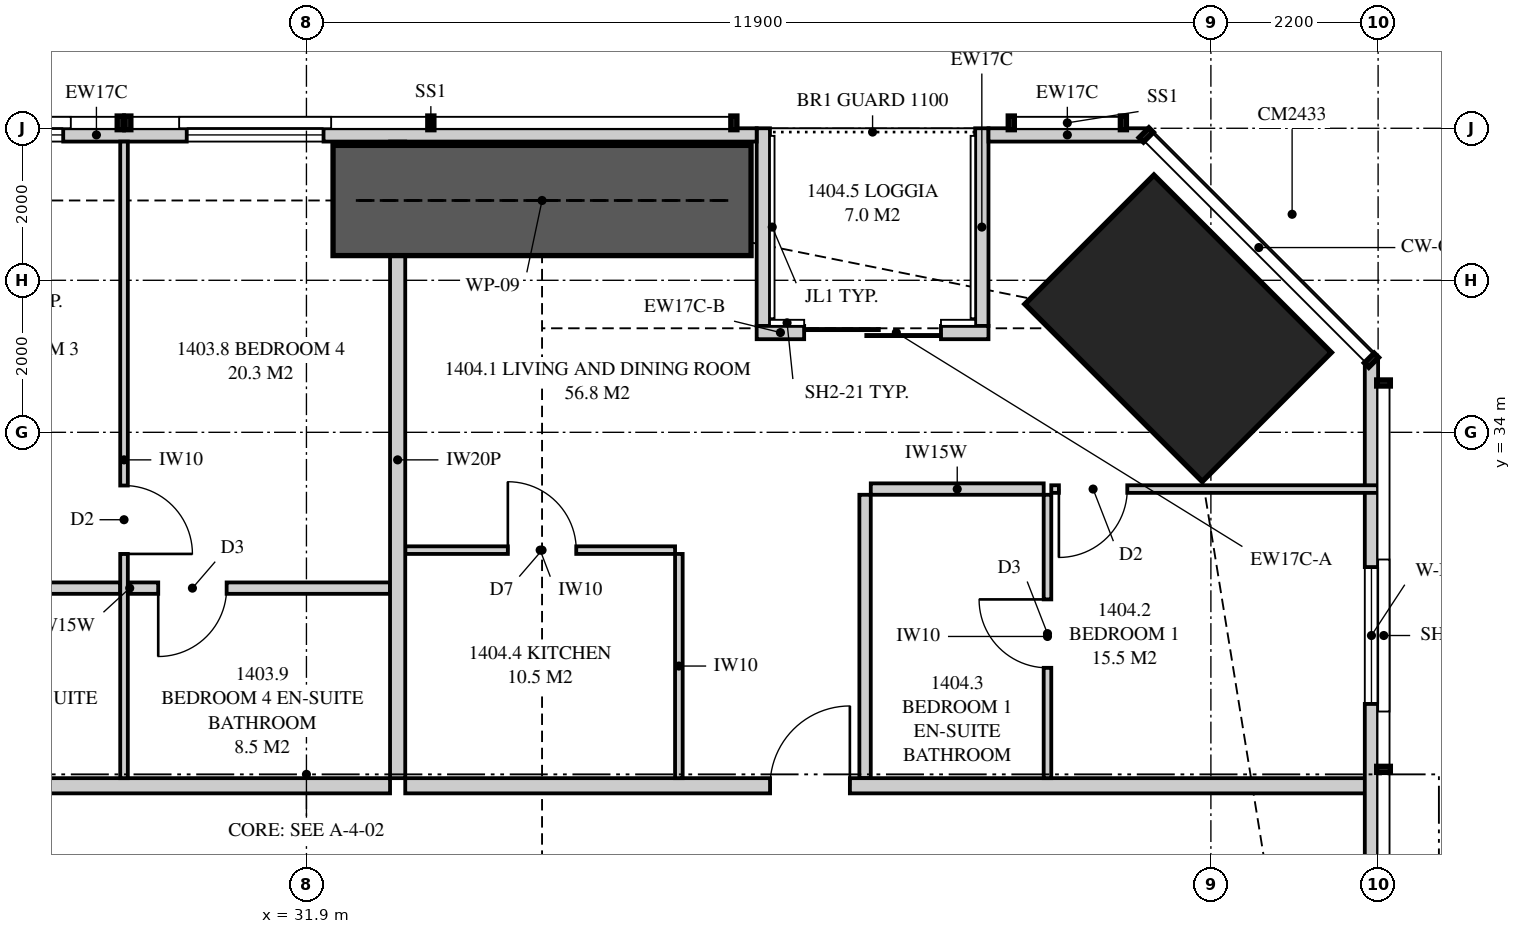
"""IFC4 building model, lengths in metres.
Left out: names, types, materials, properties, quantities, classifications, styles, units other than length and angle.
Written with IfcOpenShell. Run it as: python <this file> out.ifc"""

import sys

from ifc_helpers import new_model, si_unit, direction, frame, frame_2d, origin, origin_2d, place, context, subcontext, project, spatial, polyline, rectangle, outline, extrude, element, fill, save


model = new_model("IFC4")
c1 = context("Model", 3, precision=1e-05, world=origin(), true_north=direction((0.0, 1.0)))
c2 = subcontext(c1, "Body", "Model", "MODEL_VIEW")
j1 = project(units=[si_unit("LENGTHUNIT", "METRE"), si_unit("PLANEANGLEUNIT", "RADIAN")], contexts=[c1])
p1 = place(None, origin())
s1 = spatial("IfcSite", under=j1, at=p1, CompositionType="ELEMENT")
p2 = place(p1, origin())
s2 = spatial("IfcBuilding", under=s1, at=p2, CompositionType="ELEMENT")
p3 = place(p2, frame((0.0, 0.0, 54.5)))
s3 = spatial("IfcBuildingStorey", under=s2, at=p3, CompositionType="ELEMENT", Elevation=54.5)
p4 = place(p3, frame((43.369, 35.369, 0.0), z_axis=(0.0, 0.0, 1.0), x_axis=(-0.707106781187, -0.707106781187, 0.0)))
e1 = element("IfcColumn", 1, at=p4, inside=s3, PredefinedType="COLUMN", context=c2, shape_type="SweptSolid", body=[
    extrude(rectangle(XDim=2.4, YDim=3.3, at=origin_2d()), origin(), (0.0, 0.0, 1.0), 3.35),
])
p5 = place(p3, frame((45.913, 3.051, 0.0), z_axis=(0.0, 0.0, 1.0), x_axis=(0.0, 1.0, 0.0)))
e2 = element("IfcWall", 2, at=p5, inside=s3, PredefinedType="SOLIDWALL", context=c2, shape_type="SweptSolid", body=[
    extrude(outline(polyline([(0.0, 0.0), (31.897, 0.0), (31.897, 3.11), (22.167, 3.11), (22.167, 2.15), (22.074, 2.15), (22.074, 3.11), (21.949, 3.11), (21.949, 2.15), (9.949, 2.15), (9.949, 3.11), (9.823, 3.11), (9.823, 2.15), (9.73, 2.15), (9.73, 3.11), (0.0, 3.11), (0.0, 0.0)])), frame((0.0, 0.087, 0.0), z_axis=(0.0, -1.0, 0.0), x_axis=(1.0, 0.0, 0.0)), (0.0, 0.0, 1.0), 0.175),
])
p6 = place(p5, frame((2.222, 0.0, 0.4)))
e3 = element("IfcOpeningElement", 3, at=p6, cuts=e2, PredefinedType="OPENING", context=c2, shape_type="SweptSolid", body=[
    extrude(rectangle(XDim=1.8, YDim=1.7, at=frame_2d((0.9, 0.85))), frame((0.0, 0.097, 0.0), z_axis=(0.0, -1.0, 0.0), x_axis=(1.0, 0.0, 0.0)), (0.0, 0.0, 1.0), 0.195),
])
p7 = place(p5, frame((14.849, 0.0, 0.4)))
e4 = element("IfcOpeningElement", 4, at=p7, cuts=e2, PredefinedType="OPENING", context=c2, shape_type="SweptSolid", body=[
    extrude(rectangle(XDim=1.2, YDim=1.7, at=frame_2d((0.6, 0.85))), frame((0.0, 0.097, 0.0), z_axis=(0.0, -1.0, 0.0), x_axis=(1.0, 0.0, 0.0)), (0.0, 0.0, 1.0), 0.195),
])
p8 = place(p5, frame((27.375, 0.0, 0.4)))
e5 = element("IfcOpeningElement", 5, at=p8, cuts=e2, PredefinedType="OPENING", context=c2, shape_type="SweptSolid", body=[
    extrude(rectangle(XDim=1.8, YDim=1.7, at=frame_2d((0.9, 0.85))), frame((0.0, 0.097, 0.0), z_axis=(0.0, -1.0, 0.0), x_axis=(1.0, 0.0, 0.0)), (0.0, 0.0, 1.0), 0.195),
])
p9 = place(p3, frame((42.949, 37.913, 0.0), z_axis=(0.0, 0.0, 1.0), x_axis=(-1.0, 0.0, 0.0)))
e6 = element("IfcWall", 6, at=p9, inside=s3, PredefinedType="SOLIDWALL", context=c2, shape_type="SweptSolid", body=[
    extrude(rectangle(XDim=2.075, YDim=0.175, at=frame_2d((1.038, 0.0))), origin(), (0.0, 0.0, 1.0), 3.11),
])
p10 = place(p3, frame((37.824, 37.913, 0.0), z_axis=(0.0, 0.0, 1.0), x_axis=(-1.0, 0.0, 0.0)))
e7 = element("IfcWall", 7, at=p10, inside=s3, PredefinedType="SOLIDWALL", context=c2, shape_type="SweptSolid", body=[
    extrude(outline(polyline([(0.0, 0.0), (17.374, 0.0), (17.374, 2.15), (2.824, 2.15), (2.824, 3.11), (2.668, 3.11), (2.668, 2.15), (2.62, 2.15), (2.62, 3.11), (0.0, 3.11), (0.0, 0.0)])), frame((0.0, 0.087, 0.0), z_axis=(0.0, -1.0, 0.0), x_axis=(1.0, 0.0, 0.0)), (0.0, 0.0, 1.0), 0.175),
])
p11 = place(p10, frame((5.699, 0.0, 0.4)))
e8 = element("IfcOpeningElement", 8, at=p11, cuts=e7, PredefinedType="OPENING", context=c2, shape_type="SweptSolid", body=[
    extrude(rectangle(XDim=1.8, YDim=1.7, at=frame_2d((0.9, 0.85))), frame((0.0, 0.097, 0.0), z_axis=(0.0, -1.0, 0.0), x_axis=(1.0, 0.0, 0.0)), (0.0, 0.0, 1.0), 0.195),
])
p12 = place(p10, frame((9.124, 0.0, 0.4)))
e9 = element("IfcOpeningElement", 9, at=p12, cuts=e7, PredefinedType="OPENING", context=c2, shape_type="SweptSolid", body=[
    extrude(rectangle(XDim=1.8, YDim=1.7, at=frame_2d((0.9, 0.85))), frame((0.0, 0.097, 0.0), z_axis=(0.0, -1.0, 0.0), x_axis=(1.0, 0.0, 0.0)), (0.0, 0.0, 1.0), 0.195),
])
p13 = place(p3, frame((40.874, 35.312, 0.0), z_axis=(0.0, 0.0, 1.0), x_axis=(-1.0, 0.0, 0.0)))
e10 = element("IfcWall", 10, at=p13, inside=s3, PredefinedType="SOLIDWALL", context=c2, shape_type="SweptSolid", body=[
    extrude(rectangle(XDim=2.425, YDim=0.175, at=frame_2d((1.212, 0.0))), origin(), (0.0, 0.0, 1.0), 2.15),
])
p14 = place(p13, frame((0.625, 0.0, 0.0)))
e11 = element("IfcOpeningElement", 11, at=p14, cuts=e10, PredefinedType="OPENING", context=c2, shape_type="SweptSolid", body=[
    extrude(rectangle(XDim=1.8, YDim=2.1, at=frame_2d((0.9, 1.05))), frame((0.0, 0.097, 0.0), z_axis=(0.0, -1.0, 0.0), x_axis=(1.0, 0.0, 0.0)), (0.0, 0.0, 1.0), 0.195),
])
p15 = place(p3, frame((38.449, 35.312, 0.0), z_axis=(0.0, 0.0, 1.0), x_axis=(-1.0, 0.0, 0.0)))
e12 = element("IfcWall", 12, at=p15, inside=s3, PredefinedType="SOLIDWALL", context=c2, shape_type="SweptSolid", body=[
    extrude(rectangle(XDim=0.625, YDim=0.175, at=frame_2d((0.312, 0.0))), origin(), (0.0, 0.0, 1.0), 2.51),
])
p16 = place(p3, frame((40.786, 38.0, 0.0), z_axis=(0.0, 0.0, 1.0), x_axis=(0.0, -1.0, 0.0)))
e13 = element("IfcWall", 13, at=p16, inside=s3, PredefinedType="SOLIDWALL", context=c2, shape_type="SweptSolid", body=[
    extrude(outline(polyline([(0.0, 0.0), (2.6, 0.0), (2.6, 2.15), (1.279, 2.15), (1.279, 3.11), (0.0, 3.11), (0.0, 0.0)])), frame((0.0, 0.087, 0.0), z_axis=(0.0, -1.0, 0.0), x_axis=(1.0, 0.0, 0.0)), (0.0, 0.0, 1.0), 0.175),
])
p17 = place(p3, frame((37.911, 38.0, 0.0), z_axis=(0.0, 0.0, 1.0), x_axis=(0.0, -1.0, 0.0)))
e14 = element("IfcWall", 14, at=p17, inside=s3, PredefinedType="SOLIDWALL", context=c2, shape_type="SweptSolid", body=[
    extrude(outline(polyline([(0.0, 0.0), (2.6, 0.0), (2.6, 2.51), (2.368, 2.51), (2.368, 2.15), (0.701, 2.15), (0.701, 3.11), (0.0, 3.11), (0.0, 0.0)])), frame((0.0, 0.087, 0.0), z_axis=(0.0, -1.0, 0.0), x_axis=(1.0, 0.0, 0.0)), (0.0, 0.0, 1.0), 0.175),
])
p18 = place(p3, frame((33.1, 37.825, 0.0), z_axis=(0.0, 0.0, 1.0), x_axis=(0.0, -1.0, 0.0)))
e15 = element("IfcWall", 15, at=p18, inside=s3, PredefinedType="PARTITIONING", context=c2, shape_type="SweptSolid", body=[
    extrude(outline(polyline([(0.529, 2.15), (0.0, 2.15), (0.0, 0.0), (0.529, 0.0), (0.529, 0.205), (1.021, 0.205), (1.021, 0.0), (8.375, 0.0), (8.375, 3.11), (1.685, 3.11), (1.685, 2.15), (1.021, 2.15), (1.021, 1.945), (0.529, 1.945), (0.529, 2.15)])), frame((0.0, 0.1, 0.0), z_axis=(0.0, -1.0, 0.0), x_axis=(1.0, 0.0, 0.0)), (0.0, 0.0, 1.0), 0.2),
])
p19 = place(p3, frame((17.725, 29.35, 0.0), z_axis=(0.0, 0.0, 1.0), x_axis=(1.0, 0.0, 0.0)))
e16 = element("IfcWall", 16, at=p19, inside=s3, PredefinedType="PARTITIONING", context=c2, shape_type="SweptSolid", body=[
    extrude(outline(polyline([(0.0, 0.0), (15.275, 0.0), (15.275, 3.11), (6.612, 3.11), (6.612, 2.541), (5.938, 2.541), (5.938, 3.11), (0.0, 3.11), (0.0, 0.0)])), frame((0.0, 0.1, 0.0), z_axis=(0.0, -1.0, 0.0), x_axis=(1.0, 0.0, 0.0)), (0.0, 0.0, 1.0), 0.2),
])
p20 = place(p19, frame((0.2, 0.0, 0.0)))
e17 = element("IfcOpeningElement", 17, at=p20, cuts=e16, PredefinedType="OPENING", context=c2, shape_type="SweptSolid", body=[
    extrude(rectangle(XDim=1.05, YDim=2.2, at=frame_2d((0.525, 1.1))), frame((0.0, 0.11, 0.0), z_axis=(0.0, -1.0, 0.0), x_axis=(1.0, 0.0, 0.0)), (0.0, 0.0, 1.0), 0.22),
])
p21 = place(p3, frame((29.5, 37.825, 0.0), z_axis=(0.0, 0.0, 1.0), x_axis=(0.0, -1.0, 0.0)))
e18 = element("IfcWall", 18, at=p21, inside=s3, PredefinedType="PARTITIONING", context=c2, shape_type="SweptSolid", body=[
    extrude(outline(polyline([(0.0, 0.0), (8.375, 0.0), (8.375, 3.11), (1.635, 3.11), (1.635, 2.15), (0.0, 2.15), (0.0, 3.11), (0.0, 0.0)])), frame((0.0, 0.05, 0.0), z_axis=(0.0, -1.0, 0.0), x_axis=(1.0, 0.0, 0.0)), (0.0, 0.0, 1.0), 0.1),
])
p22 = place(p21, frame((4.525, 0.0, 0.0)))
e19 = element("IfcOpeningElement", 19, at=p22, cuts=e18, PredefinedType="OPENING", context=c2, shape_type="SweptSolid", body=[
    extrude(rectangle(XDim=0.9, YDim=2.1, at=frame_2d((0.45, 1.05))), frame((0.0, 0.06, 0.0), z_axis=(0.0, -1.0, 0.0), x_axis=(1.0, 0.0, 0.0)), (0.0, 0.0, 1.0), 0.12),
])
p23 = place(p3, frame((26.15, 31.95, 0.0), z_axis=(0.0, 0.0, 1.0), x_axis=(1.0, 0.0, 0.0)))
e20 = element("IfcWall", 20, at=p23, inside=s3, PredefinedType="PLUMBINGWALL", context=c2, shape_type="SweptSolid", body=[
    extrude(rectangle(XDim=3.3, YDim=0.15, at=frame_2d((1.65, 0.0))), origin(), (0.0, 0.0, 1.0), 3.11),
])
p24 = place(p23, frame((0.4, 0.0, 0.0)))
e21 = element("IfcOpeningElement", 21, at=p24, cuts=e20, PredefinedType="OPENING", context=c2, shape_type="SweptSolid", body=[
    extrude(rectangle(XDim=0.9, YDim=2.1, at=frame_2d((0.45, 1.05))), frame((0.0, 0.085, 0.0), z_axis=(0.0, -1.0, 0.0), x_axis=(1.0, 0.0, 0.0)), (0.0, 0.0, 1.0), 0.17),
])
p25 = place(p3, frame((29.55, 31.95, 0.0), z_axis=(0.0, 0.0, 1.0), x_axis=(1.0, 0.0, 0.0)))
e22 = element("IfcWall", 22, at=p25, inside=s3, PredefinedType="PLUMBINGWALL", context=c2, shape_type="SweptSolid", body=[
    extrude(rectangle(XDim=3.45, YDim=0.15, at=frame_2d((1.725, 0.0))), origin(), (0.0, 0.0, 1.0), 3.11),
])
p26 = place(p25, frame((0.4, 0.0, 0.0)))
e23 = element("IfcOpeningElement", 23, at=p26, cuts=e22, PredefinedType="OPENING", context=c2, shape_type="SweptSolid", body=[
    extrude(rectangle(XDim=0.9, YDim=2.1, at=frame_2d((0.45, 1.05))), frame((0.0, 0.085, 0.0), z_axis=(0.0, -1.0, 0.0), x_axis=(1.0, 0.0, 0.0)), (0.0, 0.0, 1.0), 0.17),
])
p27 = place(p3, frame((33.2, 29.35, 0.0), z_axis=(0.0, 0.0, 1.0), x_axis=(1.0, 0.0, 0.0)))
e24 = element("IfcWall", 24, at=p27, inside=s3, PredefinedType="PARTITIONING", context=c2, shape_type="SweptSolid", body=[
    extrude(outline(polyline([(0.0, 0.0), (12.8, 0.0), (12.8, 3.11), (12.066, 3.11), (12.066, 2.15), (10.223, 2.15), (10.223, 3.11), (2.137, 3.11), (2.137, 2.541), (1.463, 2.541), (1.463, 3.11), (0.0, 3.11), (0.0, 0.0)])), frame((0.0, 0.1, 0.0), z_axis=(0.0, -1.0, 0.0), x_axis=(1.0, 0.0, 0.0)), (0.0, 0.0, 1.0), 0.2),
])
p28 = place(p27, frame((4.8, 0.0, 0.0)))
e25 = element("IfcOpeningElement", 25, at=p28, cuts=e24, PredefinedType="OPENING", context=c2, shape_type="SweptSolid", body=[
    extrude(rectangle(XDim=1.05, YDim=2.2, at=frame_2d((0.525, 1.1))), frame((0.0, 0.11, 0.0), z_axis=(0.0, -1.0, 0.0), x_axis=(1.0, 0.0, 0.0)), (0.0, 0.0, 1.0), 0.22),
])
p29 = place(p3, frame((41.65, 33.178, 0.0), z_axis=(0.0, 0.0, 1.0), x_axis=(0.0, -1.0, 0.0)))
e26 = element("IfcWall", 26, at=p29, inside=s3, PredefinedType="PARTITIONING", context=c2, shape_type="SweptSolid", body=[
    extrude(rectangle(XDim=3.728, YDim=0.1, at=frame_2d((1.864, 0.0))), origin(), (0.0, 0.0, 1.0), 3.11),
])
p30 = place(p29, frame((1.377, 0.0, 0.0)))
e27 = element("IfcOpeningElement", 27, at=p30, cuts=e26, PredefinedType="OPENING", context=c2, shape_type="SweptSolid", body=[
    extrude(rectangle(XDim=0.9, YDim=2.1, at=frame_2d((0.45, 1.05))), frame((0.0, 0.06, 0.0), z_axis=(0.0, -1.0, 0.0), x_axis=(1.0, 0.0, 0.0)), (0.0, 0.0, 1.0), 0.12),
])
p31 = place(p3, frame((41.7, 33.253, 0.0), z_axis=(0.0, 0.0, 1.0), x_axis=(1.0, 0.0, 0.0)))
e28 = element("IfcWall", 28, at=p31, inside=s3, PredefinedType="PARTITIONING", context=c2, shape_type="SweptSolid", body=[
    extrude(outline(polyline([(0.0, 0.0), (4.3, 0.0), (4.3, 3.11), (2.883, 3.11), (2.883, 2.15), (1.14, 2.15), (1.14, 3.11), (0.0, 3.11), (0.0, 0.0)])), frame((0.0, 0.05, 0.0), z_axis=(0.0, -1.0, 0.0), x_axis=(1.0, 0.0, 0.0)), (0.0, 0.0, 1.0), 0.1),
])
p32 = place(p31, frame((0.1, 0.0, 0.0)))
e29 = element("IfcOpeningElement", 29, at=p32, cuts=e28, PredefinedType="OPENING", context=c2, shape_type="SweptSolid", body=[
    extrude(rectangle(XDim=0.9, YDim=2.1, at=frame_2d((0.45, 1.05))), frame((0.0, 0.06, 0.0), z_axis=(0.0, -1.0, 0.0), x_axis=(1.0, 0.0, 0.0)), (0.0, 0.0, 1.0), 0.12),
])
p33 = place(p3, frame((39.325, 33.253, 0.0), z_axis=(0.0, 0.0, 1.0), x_axis=(1.0, 0.0, 0.0)))
e30 = element("IfcWall", 30, at=p33, inside=s3, PredefinedType="PLUMBINGWALL", context=c2, shape_type="SweptSolid", body=[
    extrude(rectangle(XDim=2.275, YDim=0.15, at=frame_2d((1.138, 0.0))), origin(), (0.0, 0.0, 1.0), 3.11),
])
p34 = place(p3, frame((39.25, 33.178, 0.0), z_axis=(0.0, 0.0, 1.0), x_axis=(0.0, -1.0, 0.0)))
e31 = element("IfcWall", 31, at=p34, inside=s3, PredefinedType="PLUMBINGWALL", context=c2, shape_type="SweptSolid", body=[
    extrude(rectangle(XDim=3.728, YDim=0.15, at=frame_2d((1.864, 0.0))), origin(), (0.0, 0.0, 1.0), 3.11),
])
p35 = place(p3, frame((33.2, 32.45, 0.0), z_axis=(0.0, 0.0, 1.0), x_axis=(1.0, 0.0, 0.0)))
e32 = element("IfcWall", 32, at=p35, inside=s3, PredefinedType="PARTITIONING", context=c2, shape_type="SweptSolid", body=[
    extrude(outline(polyline([(0.0, 0.0), (3.55, 0.0), (3.55, 3.11), (2.087, 3.11), (2.087, 2.541), (1.513, 2.541), (1.513, 3.11), (0.0, 3.11), (0.0, 0.0)])), frame((0.0, 0.05, 0.0), z_axis=(0.0, -1.0, 0.0), x_axis=(1.0, 0.0, 0.0)), (0.0, 0.0, 1.0), 0.1),
])
p36 = place(p35, frame((1.35, 0.0, 0.0)))
e33 = element("IfcOpeningElement", 33, at=p36, cuts=e32, PredefinedType="OPENING", context=c2, shape_type="SweptSolid", body=[
    extrude(rectangle(XDim=0.9, YDim=2.1, at=frame_2d((0.45, 1.05))), frame((0.0, 0.06, 0.0), z_axis=(0.0, -1.0, 0.0), x_axis=(1.0, 0.0, 0.0)), (0.0, 0.0, 1.0), 0.12),
])
p37 = place(p3, frame((36.8, 32.4, 0.0), z_axis=(0.0, 0.0, 1.0), x_axis=(0.0, -1.0, 0.0)))
e34 = element("IfcWall", 34, at=p37, inside=s3, PredefinedType="PARTITIONING", context=c2, shape_type="SweptSolid", body=[
    extrude(rectangle(XDim=2.95, YDim=0.1, at=frame_2d((1.475, 0.0))), origin(), (0.0, 0.0, 1.0), 3.11),
])
p38 = place(p3, frame((32.25, 37.05, 0.0), z_axis=(0.0, 0.0, 1.0), x_axis=(1.0, 0.0, 0.0)))
e35 = element("IfcWall", 35, at=p38, inside=s3, PredefinedType="SHEAR", context=c2, shape_type="SweptSolid", body=[
    extrude(rectangle(XDim=5.5, YDim=1.45, at=frame_2d((2.75, 0.0))), origin(), (0.0, 0.0, 1.0), 3.35),
])
p39 = place(p8, origin())
e36 = element("IfcWindow", 36, at=p39, inside=s3, PartitioningType="SINGLE_PANEL", PredefinedType="WINDOW", context=c2, shape_type="SweptSolid", body=[
    extrude(rectangle(XDim=1.8, YDim=1.7, at=frame_2d((0.9, 0.85))), frame((0.0, 0.03, 0.0), z_axis=(0.0, -1.0, 0.0), x_axis=(1.0, 0.0, 0.0)), (0.0, 0.0, 1.0), 0.06),
])
fill(e5, e36)
p40 = place(p14, origin())
e37 = element("IfcDoor", 37, at=p40, inside=s3, OperationType="SLIDING_TO_LEFT", PredefinedType="DOOR", context=c2, shape_type="SweptSolid", body=[
    extrude(rectangle(XDim=1.8, YDim=2.1, at=frame_2d((0.9, 1.05))), frame((0.0, 0.025, 0.0), z_axis=(0.0, -1.0, 0.0), x_axis=(1.0, 0.0, 0.0)), (0.0, 0.0, 1.0), 0.05),
])
fill(e11, e37)
p41 = place(p11, origin())
e38 = element("IfcWindow", 38, at=p41, inside=s3, PartitioningType="SINGLE_PANEL", PredefinedType="WINDOW", context=c2, shape_type="SweptSolid", body=[
    extrude(rectangle(XDim=1.8, YDim=1.7, at=frame_2d((0.9, 0.85))), frame((0.0, 0.03, 0.0), z_axis=(0.0, -1.0, 0.0), x_axis=(1.0, 0.0, 0.0)), (0.0, 0.0, 1.0), 0.06),
])
fill(e8, e38)
p42 = place(p12, origin())
e39 = element("IfcWindow", 39, at=p42, inside=s3, PartitioningType="SINGLE_PANEL", PredefinedType="WINDOW", context=c2, shape_type="SweptSolid", body=[
    extrude(rectangle(XDim=1.8, YDim=1.7, at=frame_2d((0.9, 0.85))), frame((0.0, 0.03, 0.0), z_axis=(0.0, -1.0, 0.0), x_axis=(1.0, 0.0, 0.0)), (0.0, 0.0, 1.0), 0.06),
])
fill(e9, e39)
p43 = place(p22, origin())
e40 = element("IfcDoor", 40, at=p43, inside=s3, OperationType="SINGLE_SWING_RIGHT", PredefinedType="DOOR", context=c2, shape_type="SweptSolid", body=[
    extrude(rectangle(XDim=0.9, YDim=2.1, at=frame_2d((0.45, 1.05))), frame((0.0, 0.025, 0.0), z_axis=(0.0, -1.0, 0.0), x_axis=(1.0, 0.0, 0.0)), (0.0, 0.0, 1.0), 0.05),
])
fill(e19, e40)
p44 = place(p26, frame((0.9, 0.0, 0.0), z_axis=(0.0, 0.0, 1.0), x_axis=(-1.0, 0.0, 0.0)))
e41 = element("IfcDoor", 41, at=p44, inside=s3, OperationType="SINGLE_SWING_RIGHT", PredefinedType="DOOR", context=c2, shape_type="SweptSolid", body=[
    extrude(rectangle(XDim=0.9, YDim=2.1, at=frame_2d((0.45, 1.05))), frame((0.0, 0.025, 0.0), z_axis=(0.0, -1.0, 0.0), x_axis=(1.0, 0.0, 0.0)), (0.0, 0.0, 1.0), 0.05),
])
fill(e23, e41)
p45 = place(p28, origin())
e42 = element("IfcDoor", 42, at=p45, inside=s3, OperationType="SINGLE_SWING_RIGHT", PredefinedType="DOOR", context=c2, shape_type="SweptSolid", body=[
    extrude(rectangle(XDim=1.05, YDim=2.2, at=frame_2d((0.525, 1.1))), frame((0.0, 0.025, 0.0), z_axis=(0.0, -1.0, 0.0), x_axis=(1.0, 0.0, 0.0)), (0.0, 0.0, 1.0), 0.05),
])
fill(e25, e42)
p46 = place(p32, frame((0.9, 0.0, 0.0), z_axis=(0.0, 0.0, 1.0), x_axis=(-1.0, 0.0, 0.0)))
e43 = element("IfcDoor", 43, at=p46, inside=s3, OperationType="SINGLE_SWING_RIGHT", PredefinedType="DOOR", context=c2, shape_type="SweptSolid", body=[
    extrude(rectangle(XDim=0.9, YDim=2.1, at=frame_2d((0.45, 1.05))), frame((0.0, 0.025, 0.0), z_axis=(0.0, -1.0, 0.0), x_axis=(1.0, 0.0, 0.0)), (0.0, 0.0, 1.0), 0.05),
])
fill(e29, e43)
p47 = place(p30, frame((0.9, 0.0, 0.0), z_axis=(0.0, 0.0, 1.0), x_axis=(-1.0, 0.0, 0.0)))
e44 = element("IfcDoor", 44, at=p47, inside=s3, OperationType="SINGLE_SWING_RIGHT", PredefinedType="DOOR", context=c2, shape_type="SweptSolid", body=[
    extrude(rectangle(XDim=0.9, YDim=2.1, at=frame_2d((0.45, 1.05))), frame((0.0, 0.025, 0.0), z_axis=(0.0, -1.0, 0.0), x_axis=(1.0, 0.0, 0.0)), (0.0, 0.0, 1.0), 0.05),
])
fill(e27, e44)
p48 = place(p36, origin())
e45 = element("IfcDoor", 45, at=p48, inside=s3, OperationType="SINGLE_SWING_LEFT", PredefinedType="DOOR", context=c2, shape_type="SweptSolid", body=[
    extrude(rectangle(XDim=0.9, YDim=2.1, at=frame_2d((0.45, 1.05))), frame((0.0, 0.025, 0.0), z_axis=(0.0, -1.0, 0.0), x_axis=(1.0, 0.0, 0.0)), (0.0, 0.0, 1.0), 0.05),
])
fill(e33, e45)
save(model, sys.argv[1])
